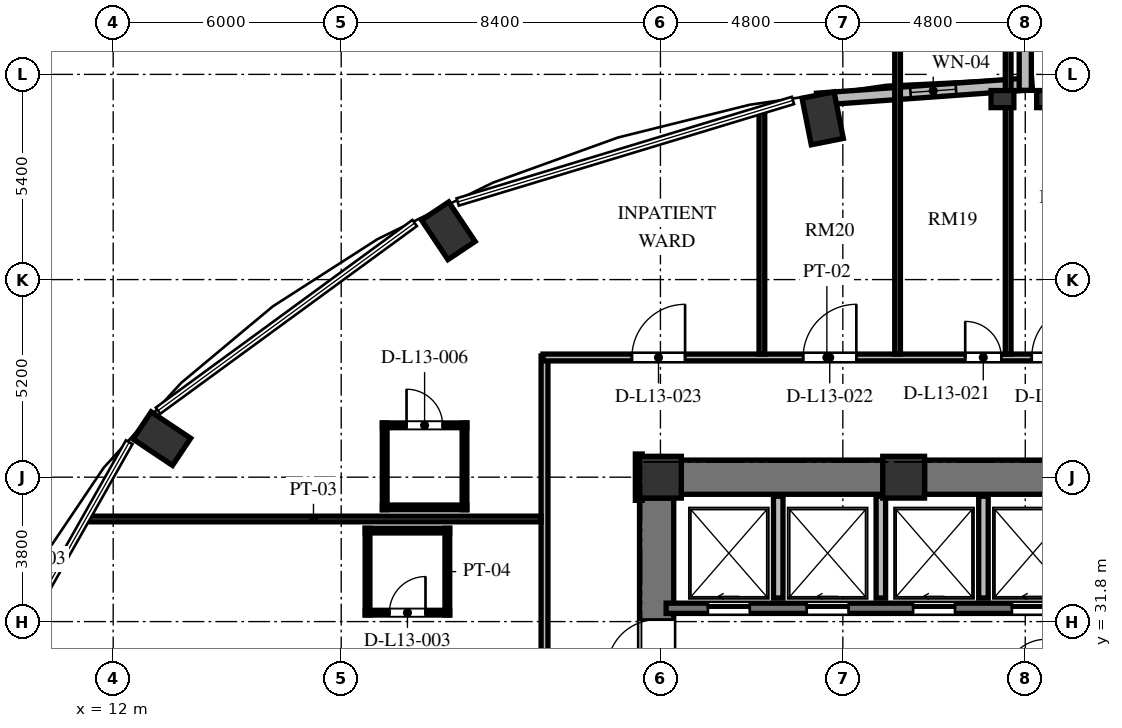
"""IFC4 building model, lengths in metres.
Left out: names, types, materials, properties, quantities, classifications, styles, units other than length and angle.
Written with IfcOpenShell. Run it as: python <this file> out.ifc"""

import sys

from ifc_helpers import new_model, si_unit, direction, frame, frame_2d, origin, origin_2d, place, context, subcontext, project, spatial, rectangle, extrude, element, fill, save


model = new_model("IFC4")
c1 = context("Model", 3, precision=1e-05, world=origin(), true_north=direction((0.0, 1.0)))
c2 = subcontext(c1, "Body", "Model", "MODEL_VIEW")
j1 = project(units=[si_unit("LENGTHUNIT", "METRE"), si_unit("PLANEANGLEUNIT", "RADIAN")], contexts=[c1])
p1 = place(None, origin())
s1 = spatial("IfcSite", under=j1, at=p1, CompositionType="ELEMENT")
p2 = place(p1, origin())
s2 = spatial("IfcBuilding", under=s1, at=p2, CompositionType="ELEMENT")
p3 = place(p2, frame((0.0, 0.0, 54.384)))
s3 = spatial("IfcBuildingStorey", under=s2, at=p3, CompositionType="ELEMENT", Elevation=54.384)
for number, where, z_axis, x_axis in (
    (1, (30.669, 45.044, 0.0), (0.0, 0.0, 1.0), (-0.195, 0.981, 0.0)),
    (2, (20.819, 42.084, 0.0), (0.0, 0.0, 1.0), (-0.556, 0.831, 0.0)),
    (3, (13.28, 36.614, 0.0), (0.0, 0.0, 1.0), (-0.831, 0.556, 0.0)),
):
    element("IfcColumn", number, at=place(p3, frame(where, z_axis=z_axis, x_axis=x_axis)), inside=s3, PredefinedType="COLUMN", context=c2, shape_type="SweptSolid", body=[
        extrude(rectangle(XDim=1.25, YDim=0.86, at=origin_2d()), origin(), (0.0, 0.0, 1.0), 3.648),
    ])
for number, where, z_axis, x_axis in (
    (4, (32.8, 35.6, 0.0), (0.0, 0.0, 1.0), (1.0, 0.0, 0.0)),
    (5, (26.4, 35.6, 0.0), (0.0, 0.0, 1.0), (1.0, 0.0, 0.0)),
):
    element("IfcColumn", number, at=place(p3, frame(where, z_axis=z_axis, x_axis=x_axis)), inside=s3, PredefinedType="COLUMN", context=c2, shape_type="SweptSolid", body=[
        extrude(rectangle(XDim=1.1, YDim=1.1, at=origin_2d()), origin(), (0.0, 0.0, 1.0), 3.648),
    ])
for number, where, z_axis, x_axis in (
    (6, (35.4, 45.55, 0.0), (0.0, 0.0, 1.0), (1.0, 0.0, 0.0)),
    (7, (36.6, 45.55, 0.0), (0.0, 0.0, 1.0), (1.0, 0.0, 0.0)),
):
    element("IfcColumn", number, at=place(p3, frame(where, z_axis=z_axis, x_axis=x_axis)), inside=s3, PredefinedType="PILASTER", context=c2, shape_type="SweptSolid", body=[
        extrude(rectangle(XDim=0.6, YDim=0.45, at=origin_2d()), origin(), (0.0, 0.0, 1.0), 3.648),
    ])
p4 = place(p3, frame((26.3, 20.95, 0.0), z_axis=(0.0, 0.0, 1.0), x_axis=(0.0, 1.0, 0.0)))
e8 = element("IfcWall", 8, at=p4, inside=s3, PredefinedType="SHEAR", context=c2, shape_type="SweptSolid", body=[
    extrude(rectangle(XDim=14.1, YDim=0.9, at=frame_2d((7.05, 0.0))), origin(), (0.0, 0.0, 1.0), 3.648),
])
p5 = place(p4, frame((6.5, 0.0, 0.0)))
e9 = element("IfcOpeningElement", 9, at=p5, cuts=e8, PredefinedType="OPENING", context=c2, shape_type="SweptSolid", body=[
    extrude(rectangle(XDim=1.2, YDim=2.15, at=frame_2d((0.6, 1.075))), frame((0.0, 0.46, 0.0), z_axis=(0.0, -1.0, 0.0), x_axis=(1.0, 0.0, 0.0)), (0.0, 0.0, 1.0), 0.92),
])
p6 = place(p4, frame((9.6, 0.0, 0.0)))
e10 = element("IfcOpeningElement", 10, at=p6, cuts=e8, PredefinedType="OPENING", context=c2, shape_type="SweptSolid", body=[
    extrude(rectangle(XDim=1.3, YDim=2.2, at=frame_2d((0.65, 1.1))), frame((0.0, 0.46, 0.0), z_axis=(0.0, -1.0, 0.0), x_axis=(1.0, 0.0, 0.0)), (0.0, 0.0, 1.0), 0.92),
])
p7 = place(p4, frame((3.26, 0.0, 0.0)))
e11 = element("IfcOpeningElement", 11, at=p7, cuts=e8, PredefinedType="OPENING", context=c2, shape_type="SweptSolid", body=[
    extrude(rectangle(XDim=1.3, YDim=2.2, at=frame_2d((0.65, 1.1))), frame((0.0, 0.46, 0.0), z_axis=(0.0, -1.0, 0.0), x_axis=(1.0, 0.0, 0.0)), (0.0, 0.0, 1.0), 0.92),
])
p8 = place(p3, frame((26.95, 35.6, 0.0), z_axis=(0.0, 0.0, 1.0), x_axis=(1.0, 0.0, 0.0)))
e12 = element("IfcWall", 12, at=p8, inside=s3, PredefinedType="SHEAR", context=c2, shape_type="SweptSolid", body=[
    extrude(rectangle(XDim=5.3, YDim=0.9, at=frame_2d((2.65, 0.0))), origin(), (0.0, 0.0, 1.0), 3.648),
])
p9 = place(p3, frame((33.35, 35.6, 0.0), z_axis=(0.0, 0.0, 1.0), x_axis=(1.0, 0.0, 0.0)))
e13 = element("IfcWall", 13, at=p9, inside=s3, PredefinedType="SHEAR", context=c2, shape_type="SweptSolid", body=[
    extrude(rectangle(XDim=5.3, YDim=0.9, at=frame_2d((2.65, 0.0))), origin(), (0.0, 0.0, 1.0), 3.648),
])
p10 = place(p3, frame((36.179, 45.953, 0.0), z_axis=(0.0, 0.0, 1.0), x_axis=(-0.997421878774, -0.071760683825, 0.0)))
e14 = element("IfcWall", 14, at=p10, inside=s3, PredefinedType="SOLIDWALL", context=c2, shape_type="SweptSolid", body=[
    extrude(rectangle(XDim=5.675, YDim=0.32, at=frame_2d((2.837, 0.0))), origin(), (0.0, 0.0, 1.0), 3.428),
])
p11 = place(p10, frame((2.007, 0.0, 0.85)))
e15 = element("IfcOpeningElement", 15, at=p11, cuts=e14, PredefinedType="OPENING", context=c2, shape_type="SweptSolid", body=[
    extrude(rectangle(XDim=1.2, YDim=1.8, at=frame_2d((0.6, 0.9))), frame((0.0, 0.17, 0.0), z_axis=(0.0, -1.0, 0.0), x_axis=(1.0, 0.0, 0.0)), (0.0, 0.0, 1.0), 0.34),
])
p12 = place(p3, frame((36.0, 50.9, 0.0), z_axis=(0.0, 0.0, 1.0), x_axis=(0.0, -1.0, 0.0)))
e16 = element("IfcWall", 16, at=p12, inside=s3, PredefinedType="SOLIDWALL", context=c2, shape_type="SweptSolid", body=[
    extrude(rectangle(XDim=5.12, YDim=0.32, at=frame_2d((2.56, 0.0))), origin(), (0.0, 0.0, 1.0), 3.428),
])
p13 = place(p12, frame((1.36, 0.0, 0.84)))
e17 = element("IfcOpeningElement", 17, at=p13, cuts=e16, PredefinedType="OPENING", context=c2, shape_type="SweptSolid", body=[
    extrude(rectangle(XDim=2.4, YDim=2.04, at=frame_2d((1.2, 1.02))), frame((0.0, 0.17, 0.0), z_axis=(0.0, -1.0, 0.0), x_axis=(1.0, 0.0, 0.0)), (0.0, 0.0, 1.0), 0.34),
])
p14 = place(p3, frame((26.55, 32.15, 0.0), z_axis=(0.0, 0.0, 1.0), x_axis=(1.0, 0.0, 0.0)))
e18 = element("IfcWall", 18, at=p14, inside=s3, PredefinedType="SHEAR", context=c2, shape_type="SweptSolid", body=[
    extrude(rectangle(XDim=16.4, YDim=0.27, at=frame_2d((8.2, 0.0))), origin(), (0.0, 0.0, 1.0), 3.648),
])
p15 = place(p14, frame((1.1, 0.0, 0.0)))
e19 = element("IfcOpeningElement", 19, at=p15, cuts=e18, PredefinedType="OPENING", context=c2, shape_type="SweptSolid", body=[
    extrude(rectangle(XDim=1.1, YDim=2.2, at=frame_2d((0.55, 1.1))), frame((0.0, 0.145, 0.0), z_axis=(0.0, -1.0, 0.0), x_axis=(1.0, 0.0, 0.0)), (0.0, 0.0, 1.0), 0.29),
])
p16 = place(p14, frame((3.7, 0.0, 0.0)))
e20 = element("IfcOpeningElement", 20, at=p16, cuts=e18, PredefinedType="OPENING", context=c2, shape_type="SweptSolid", body=[
    extrude(rectangle(XDim=1.1, YDim=2.2, at=frame_2d((0.55, 1.1))), frame((0.0, 0.145, 0.0), z_axis=(0.0, -1.0, 0.0), x_axis=(1.0, 0.0, 0.0)), (0.0, 0.0, 1.0), 0.29),
])
p17 = place(p14, frame((6.5, 0.0, 0.0)))
e21 = element("IfcOpeningElement", 21, at=p17, cuts=e18, PredefinedType="OPENING", context=c2, shape_type="SweptSolid", body=[
    extrude(rectangle(XDim=1.1, YDim=2.2, at=frame_2d((0.55, 1.1))), frame((0.0, 0.145, 0.0), z_axis=(0.0, -1.0, 0.0), x_axis=(1.0, 0.0, 0.0)), (0.0, 0.0, 1.0), 0.29),
])
p18 = place(p14, frame((9.1, 0.0, 0.0)))
e22 = element("IfcOpeningElement", 22, at=p18, cuts=e18, PredefinedType="OPENING", context=c2, shape_type="SweptSolid", body=[
    extrude(rectangle(XDim=1.1, YDim=2.2, at=frame_2d((0.55, 1.1))), frame((0.0, 0.145, 0.0), z_axis=(0.0, -1.0, 0.0), x_axis=(1.0, 0.0, 0.0)), (0.0, 0.0, 1.0), 0.29),
])
p19 = place(p14, frame((11.9, 0.0, 0.0)))
e23 = element("IfcOpeningElement", 23, at=p19, cuts=e18, PredefinedType="OPENING", context=c2, shape_type="SweptSolid", body=[
    extrude(rectangle(XDim=1.1, YDim=2.2, at=frame_2d((0.55, 1.1))), frame((0.0, 0.145, 0.0), z_axis=(0.0, -1.0, 0.0), x_axis=(1.0, 0.0, 0.0)), (0.0, 0.0, 1.0), 0.29),
])
p20 = place(p14, frame((14.5, 0.0, 0.0)))
e24 = element("IfcOpeningElement", 24, at=p20, cuts=e18, PredefinedType="OPENING", context=c2, shape_type="SweptSolid", body=[
    extrude(rectangle(XDim=1.1, YDim=2.2, at=frame_2d((0.55, 1.1))), frame((0.0, 0.145, 0.0), z_axis=(0.0, -1.0, 0.0), x_axis=(1.0, 0.0, 0.0)), (0.0, 0.0, 1.0), 0.29),
])
for number, where, z_axis, x_axis in (
    (25, (29.5, 32.42, 0.0), (0.0, 0.0, 1.0), (0.0, 1.0, 0.0)),
    (26, (32.2, 32.42, 0.0), (0.0, 0.0, 1.0), (0.0, 1.0, 0.0)),
    (27, (34.9, 32.42, 0.0), (0.0, 0.0, 1.0), (0.0, 1.0, 0.0)),
):
    element("IfcWall", number, at=place(p3, frame(where, z_axis=z_axis, x_axis=x_axis)), inside=s3, PredefinedType="SOLIDWALL", context=c2, shape_type="SweptSolid", body=[
        extrude(rectangle(XDim=2.68, YDim=0.25, at=frame_2d((1.34, 0.0))), origin(), (0.0, 0.0, 1.0), 3.428),
    ])
p21 = place(p3, frame((23.35, 29.36, 0.0), z_axis=(0.0, 0.0, 1.0), x_axis=(0.0, 1.0, 0.0)))
e28 = element("IfcWall", 28, at=p21, inside=s3, PredefinedType="PARTITIONING", context=c2, shape_type="SweptSolid", body=[
    extrude(rectangle(XDim=9.43, YDim=0.18, at=frame_2d((4.715, 0.0))), origin(), (0.0, 0.0, 1.0), 3.428),
])
p22 = place(p3, frame((23.31, 38.75, 0.0), z_axis=(0.0, 0.0, 1.0), x_axis=(1.0, 0.0, 0.0)))
e29 = element("IfcWall", 29, at=p22, inside=s3, PredefinedType="PARTITIONING", context=c2, shape_type="SweptSolid", body=[
    extrude(rectangle(XDim=29.88, YDim=0.18, at=frame_2d((14.94, 0.0))), origin(), (0.0, 0.0, 1.0), 3.053),
])
p23 = place(p22, frame((25.891, 0.0, 0.0)))
e30 = element("IfcOpeningElement", 30, at=p23, cuts=e29, PredefinedType="OPENING", context=c2, shape_type="SweptSolid", body=[
    extrude(rectangle(XDim=1.4, YDim=2.2, at=frame_2d((0.7, 1.1))), frame((0.0, 0.1, 0.0), z_axis=(0.0, -1.0, 0.0), x_axis=(1.0, 0.0, 0.0)), (0.0, 0.0, 1.0), 0.2),
])
p24 = place(p22, frame((21.135, 0.0, 0.0)))
e31 = element("IfcOpeningElement", 31, at=p24, cuts=e29, PredefinedType="OPENING", context=c2, shape_type="SweptSolid", body=[
    extrude(rectangle(XDim=1.4, YDim=2.2, at=frame_2d((0.7, 1.1))), frame((0.0, 0.1, 0.0), z_axis=(0.0, -1.0, 0.0), x_axis=(1.0, 0.0, 0.0)), (0.0, 0.0, 1.0), 0.2),
])
p25 = place(p22, frame((17.565, 0.0, 0.0)))
e32 = element("IfcOpeningElement", 32, at=p25, cuts=e29, PredefinedType="OPENING", context=c2, shape_type="SweptSolid", body=[
    extrude(rectangle(XDim=1.4, YDim=2.2, at=frame_2d((0.7, 1.1))), frame((0.0, 0.1, 0.0), z_axis=(0.0, -1.0, 0.0), x_axis=(1.0, 0.0, 0.0)), (0.0, 0.0, 1.0), 0.2),
])
p26 = place(p22, frame((12.86, 0.0, 0.0)))
e33 = element("IfcOpeningElement", 33, at=p26, cuts=e29, PredefinedType="OPENING", context=c2, shape_type="SweptSolid", body=[
    extrude(rectangle(XDim=1.4, YDim=2.2, at=frame_2d((0.7, 1.1))), frame((0.0, 0.1, 0.0), z_axis=(0.0, -1.0, 0.0), x_axis=(1.0, 0.0, 0.0)), (0.0, 0.0, 1.0), 0.2),
])
p27 = place(p22, frame((11.11, 0.0, 0.0)))
e34 = element("IfcOpeningElement", 34, at=p27, cuts=e29, PredefinedType="OPENING", context=c2, shape_type="SweptSolid", body=[
    extrude(rectangle(XDim=0.95, YDim=2.1, at=frame_2d((0.475, 1.05))), frame((0.0, 0.1, 0.0), z_axis=(0.0, -1.0, 0.0), x_axis=(1.0, 0.0, 0.0)), (0.0, 0.0, 1.0), 0.2),
])
p28 = place(p22, frame((6.845, 0.0, 0.0)))
e35 = element("IfcOpeningElement", 35, at=p28, cuts=e29, PredefinedType="OPENING", context=c2, shape_type="SweptSolid", body=[
    extrude(rectangle(XDim=1.4, YDim=2.2, at=frame_2d((0.7, 1.1))), frame((0.0, 0.1, 0.0), z_axis=(0.0, -1.0, 0.0), x_axis=(1.0, 0.0, 0.0)), (0.0, 0.0, 1.0), 0.2),
])
p29 = place(p22, frame((2.339, 0.0, 0.0)))
e36 = element("IfcOpeningElement", 36, at=p29, cuts=e29, PredefinedType="OPENING", context=c2, shape_type="SweptSolid", body=[
    extrude(rectangle(XDim=1.4, YDim=2.2, at=frame_2d((0.7, 1.1))), frame((0.0, 0.1, 0.0), z_axis=(0.0, -1.0, 0.0), x_axis=(1.0, 0.0, 0.0)), (0.0, 0.0, 1.0), 0.2),
])
p30 = place(p3, frame((25.83, 36.21, 0.0), z_axis=(0.0, 0.0, 1.0), x_axis=(0.0, -1.0, 0.0)))
e37 = element("IfcWall", 37, at=p30, inside=s3, PredefinedType="PARTITIONING", context=c2, shape_type="SweptSolid", body=[
    extrude(rectangle(XDim=1.22, YDim=0.18, at=frame_2d((0.61, 0.0))), origin(), (0.0, 0.0, 1.0), 3.428),
])
p31 = place(p3, frame((11.281, 34.5, 0.0), z_axis=(0.0, 0.0, 1.0), x_axis=(1.0, 0.0, 0.0)))
e38 = element("IfcWall", 38, at=p31, inside=s3, PredefinedType="PARTITIONING", context=c2, shape_type="SweptSolid", body=[
    extrude(rectangle(XDim=11.979, YDim=0.15, at=frame_2d((5.99, 0.0))), origin(), (0.0, 0.0, 1.0), 3.428),
])
p32 = place(p3, frame((29.07, 38.84, 0.0), z_axis=(0.0, 0.0, 1.0), x_axis=(0.0, 1.0, 0.0)))
e39 = element("IfcWall", 39, at=p32, inside=s3, PredefinedType="PARTITIONING", context=c2, shape_type="SweptSolid", body=[
    extrude(rectangle(XDim=6.414, YDim=0.15, at=frame_2d((3.207, 0.0))), origin(), (0.0, 0.0, 1.0), 3.428),
])
p33 = place(p3, frame((32.64, 38.84, 0.0), z_axis=(0.0, 0.0, 1.0), x_axis=(0.0, 1.0, 0.0)))
e40 = element("IfcWall", 40, at=p33, inside=s3, PredefinedType="PARTITIONING", context=c2, shape_type="SweptSolid", body=[
    extrude(rectangle(XDim=8.151, YDim=0.15, at=frame_2d((4.075, 0.0))), origin(), (0.0, 0.0, 1.0), 3.428),
])
p34 = place(p3, frame((35.55, 38.84, 0.0), z_axis=(0.0, 0.0, 1.0), x_axis=(0.0, 1.0, 0.0)))
e41 = element("IfcWall", 41, at=p34, inside=s3, PredefinedType="PARTITIONING", context=c2, shape_type="SweptSolid", body=[
    extrude(rectangle(XDim=11.367, YDim=0.15, at=frame_2d((5.684, 0.0))), origin(), (0.0, 0.0, 1.0), 3.428),
])
p35 = place(p3, frame((18.633, 34.195, 0.0), z_axis=(0.0, 0.0, 1.0), x_axis=(1.0, 0.0, 0.0)))
e42 = element("IfcWall", 42, at=p35, inside=s3, PredefinedType="PARTITIONING", context=c2, shape_type="SweptSolid", body=[
    extrude(rectangle(XDim=2.22, YDim=0.125, at=frame_2d((1.11, 0.0))), origin(), (0.0, 0.0, 1.0), 3.428),
])
p36 = place(p3, frame((18.633, 32.035, 0.0), z_axis=(0.0, 0.0, 1.0), x_axis=(1.0, 0.0, 0.0)))
e43 = element("IfcWall", 43, at=p36, inside=s3, PredefinedType="PARTITIONING", context=c2, shape_type="SweptSolid", body=[
    extrude(rectangle(XDim=2.22, YDim=0.125, at=frame_2d((1.11, 0.0))), origin(), (0.0, 0.0, 1.0), 3.428),
])
p37 = place(p36, frame((0.635, 0.0, 0.0)))
e44 = element("IfcOpeningElement", 44, at=p37, cuts=e43, PredefinedType="OPENING", context=c2, shape_type="SweptSolid", body=[
    extrude(rectangle(XDim=0.95, YDim=2.1, at=frame_2d((0.475, 1.05))), frame((0.0, 0.073, 0.0), z_axis=(0.0, -1.0, 0.0), x_axis=(1.0, 0.0, 0.0)), (0.0, 0.0, 1.0), 0.145),
])
for number, where, z_axis, x_axis in (
    (45, (20.793, 31.975, 0.0), (0.0, 0.0, 1.0), (0.0, 1.0, 0.0)),
    (46, (18.693, 31.975, 0.0), (0.0, 0.0, 1.0), (0.0, 1.0, 0.0)),
):
    element("IfcWall", number, at=place(p3, frame(where, z_axis=z_axis, x_axis=x_axis)), inside=s3, PredefinedType="PARTITIONING", context=c2, shape_type="SweptSolid", body=[
        extrude(rectangle(XDim=2.28, YDim=0.125, at=frame_2d((1.14, 0.0))), origin(), (0.0, 0.0, 1.0), 3.428),
    ])
p38 = place(p3, frame((19.084, 36.965, 0.0), z_axis=(0.0, 0.0, 1.0), x_axis=(1.0, 0.0, 0.0)))
e47 = element("IfcWall", 47, at=p38, inside=s3, PredefinedType="PARTITIONING", context=c2, shape_type="SweptSolid", body=[
    extrude(rectangle(XDim=2.22, YDim=0.125, at=frame_2d((1.11, 0.0))), origin(), (0.0, 0.0, 1.0), 3.428),
])
p39 = place(p38, frame((0.635, 0.0, 0.0)))
e48 = element("IfcOpeningElement", 48, at=p39, cuts=e47, PredefinedType="OPENING", context=c2, shape_type="SweptSolid", body=[
    extrude(rectangle(XDim=0.95, YDim=2.1, at=frame_2d((0.475, 1.05))), frame((0.0, 0.073, 0.0), z_axis=(0.0, -1.0, 0.0), x_axis=(1.0, 0.0, 0.0)), (0.0, 0.0, 1.0), 0.145),
])
p40 = place(p3, frame((19.084, 34.805, 0.0), z_axis=(0.0, 0.0, 1.0), x_axis=(1.0, 0.0, 0.0)))
e49 = element("IfcWall", 49, at=p40, inside=s3, PredefinedType="PARTITIONING", context=c2, shape_type="SweptSolid", body=[
    extrude(rectangle(XDim=2.22, YDim=0.125, at=frame_2d((1.11, 0.0))), origin(), (0.0, 0.0, 1.0), 3.428),
])
for number, where, z_axis, x_axis in (
    (50, (21.244, 34.745, 0.0), (0.0, 0.0, 1.0), (0.0, 1.0, 0.0)),
    (51, (19.144, 34.745, 0.0), (0.0, 0.0, 1.0), (0.0, 1.0, 0.0)),
):
    element("IfcWall", number, at=place(p3, frame(where, z_axis=z_axis, x_axis=x_axis)), inside=s3, PredefinedType="PARTITIONING", context=c2, shape_type="SweptSolid", body=[
        extrude(rectangle(XDim=2.28, YDim=0.125, at=frame_2d((1.14, 0.0))), origin(), (0.0, 0.0, 1.0), 3.428),
    ])
p41 = place(p11, origin())
e52 = element("IfcWindow", 52, at=p41, inside=s3, PartitioningType="SINGLE_PANEL", PredefinedType="WINDOW", context=c2, shape_type="SweptSolid", body=[
    extrude(rectangle(XDim=1.2, YDim=1.8, at=frame_2d((0.6, 0.9))), frame((0.0, 0.03, 0.0), z_axis=(0.0, -1.0, 0.0), x_axis=(1.0, 0.0, 0.0)), (0.0, 0.0, 1.0), 0.06),
])
fill(e15, e52)
p42 = place(p6, origin())
e53 = element("IfcDoor", 53, at=p42, inside=s3, OperationType="SINGLE_SWING_LEFT", PredefinedType="DOOR", context=c2, shape_type="SweptSolid", body=[
    extrude(rectangle(XDim=1.3, YDim=2.2, at=frame_2d((0.65, 1.1))), frame((0.0, 0.025, 0.0), z_axis=(0.0, -1.0, 0.0), x_axis=(1.0, 0.0, 0.0)), (0.0, 0.0, 1.0), 0.05),
])
fill(e10, e53)
p43 = place(p15, origin())
e54 = element("IfcDoor", 54, at=p43, inside=s3, OperationType="SLIDING_TO_LEFT", PredefinedType="DOOR", context=c2, shape_type="SweptSolid", body=[
    extrude(rectangle(XDim=1.1, YDim=2.2, at=frame_2d((0.55, 1.1))), frame((0.0, 0.025, 0.0), z_axis=(0.0, -1.0, 0.0), x_axis=(1.0, 0.0, 0.0)), (0.0, 0.0, 1.0), 0.05),
])
fill(e19, e54)
p44 = place(p16, origin())
e55 = element("IfcDoor", 55, at=p44, inside=s3, OperationType="SLIDING_TO_LEFT", PredefinedType="DOOR", context=c2, shape_type="SweptSolid", body=[
    extrude(rectangle(XDim=1.1, YDim=2.2, at=frame_2d((0.55, 1.1))), frame((0.0, 0.025, 0.0), z_axis=(0.0, -1.0, 0.0), x_axis=(1.0, 0.0, 0.0)), (0.0, 0.0, 1.0), 0.05),
])
fill(e20, e55)
p45 = place(p17, origin())
e56 = element("IfcDoor", 56, at=p45, inside=s3, OperationType="SLIDING_TO_LEFT", PredefinedType="DOOR", context=c2, shape_type="SweptSolid", body=[
    extrude(rectangle(XDim=1.1, YDim=2.2, at=frame_2d((0.55, 1.1))), frame((0.0, 0.025, 0.0), z_axis=(0.0, -1.0, 0.0), x_axis=(1.0, 0.0, 0.0)), (0.0, 0.0, 1.0), 0.05),
])
fill(e21, e56)
p46 = place(p18, origin())
e57 = element("IfcDoor", 57, at=p46, inside=s3, OperationType="SLIDING_TO_LEFT", PredefinedType="DOOR", context=c2, shape_type="SweptSolid", body=[
    extrude(rectangle(XDim=1.1, YDim=2.2, at=frame_2d((0.55, 1.1))), frame((0.0, 0.025, 0.0), z_axis=(0.0, -1.0, 0.0), x_axis=(1.0, 0.0, 0.0)), (0.0, 0.0, 1.0), 0.05),
])
fill(e22, e57)
p47 = place(p37, origin())
e58 = element("IfcDoor", 58, at=p47, inside=s3, OperationType="SINGLE_SWING_RIGHT", PredefinedType="DOOR", context=c2, shape_type="SweptSolid", body=[
    extrude(rectangle(XDim=0.95, YDim=2.1, at=frame_2d((0.475, 1.05))), frame((0.0, 0.025, 0.0), z_axis=(0.0, -1.0, 0.0), x_axis=(1.0, 0.0, 0.0)), (0.0, 0.0, 1.0), 0.05),
])
fill(e44, e58)
p48 = place(p26, origin())
e59 = element("IfcDoor", 59, at=p48, inside=s3, OperationType="SINGLE_SWING_RIGHT", PredefinedType="DOOR", context=c2, shape_type="SweptSolid", body=[
    extrude(rectangle(XDim=1.4, YDim=2.2, at=frame_2d((0.7, 1.1))), frame((0.0, 0.025, 0.0), z_axis=(0.0, -1.0, 0.0), x_axis=(1.0, 0.0, 0.0)), (0.0, 0.0, 1.0), 0.05),
])
fill(e33, e59)
p49 = place(p27, origin())
e60 = element("IfcDoor", 60, at=p49, inside=s3, OperationType="SINGLE_SWING_LEFT", PredefinedType="DOOR", context=c2, shape_type="SweptSolid", body=[
    extrude(rectangle(XDim=0.95, YDim=2.1, at=frame_2d((0.475, 1.05))), frame((0.0, 0.025, 0.0), z_axis=(0.0, -1.0, 0.0), x_axis=(1.0, 0.0, 0.0)), (0.0, 0.0, 1.0), 0.05),
])
fill(e34, e60)
p50 = place(p28, origin())
e61 = element("IfcDoor", 61, at=p50, inside=s3, OperationType="SINGLE_SWING_RIGHT", PredefinedType="DOOR", context=c2, shape_type="SweptSolid", body=[
    extrude(rectangle(XDim=1.4, YDim=2.2, at=frame_2d((0.7, 1.1))), frame((0.0, 0.025, 0.0), z_axis=(0.0, -1.0, 0.0), x_axis=(1.0, 0.0, 0.0)), (0.0, 0.0, 1.0), 0.05),
])
fill(e35, e61)
p51 = place(p39, origin())
e62 = element("IfcDoor", 62, at=p51, inside=s3, OperationType="SINGLE_SWING_LEFT", PredefinedType="DOOR", context=c2, shape_type="SweptSolid", body=[
    extrude(rectangle(XDim=0.95, YDim=2.1, at=frame_2d((0.475, 1.05))), frame((0.0, 0.025, 0.0), z_axis=(0.0, -1.0, 0.0), x_axis=(1.0, 0.0, 0.0)), (0.0, 0.0, 1.0), 0.05),
])
fill(e48, e62)
p52 = place(p29, origin())
e63 = element("IfcDoor", 63, at=p52, inside=s3, OperationType="SINGLE_SWING_RIGHT", PredefinedType="DOOR", context=c2, shape_type="SweptSolid", body=[
    extrude(rectangle(XDim=1.4, YDim=2.2, at=frame_2d((0.7, 1.1))), frame((0.0, 0.025, 0.0), z_axis=(0.0, -1.0, 0.0), x_axis=(1.0, 0.0, 0.0)), (0.0, 0.0, 1.0), 0.05),
])
fill(e36, e63)
save(model, sys.argv[1])
